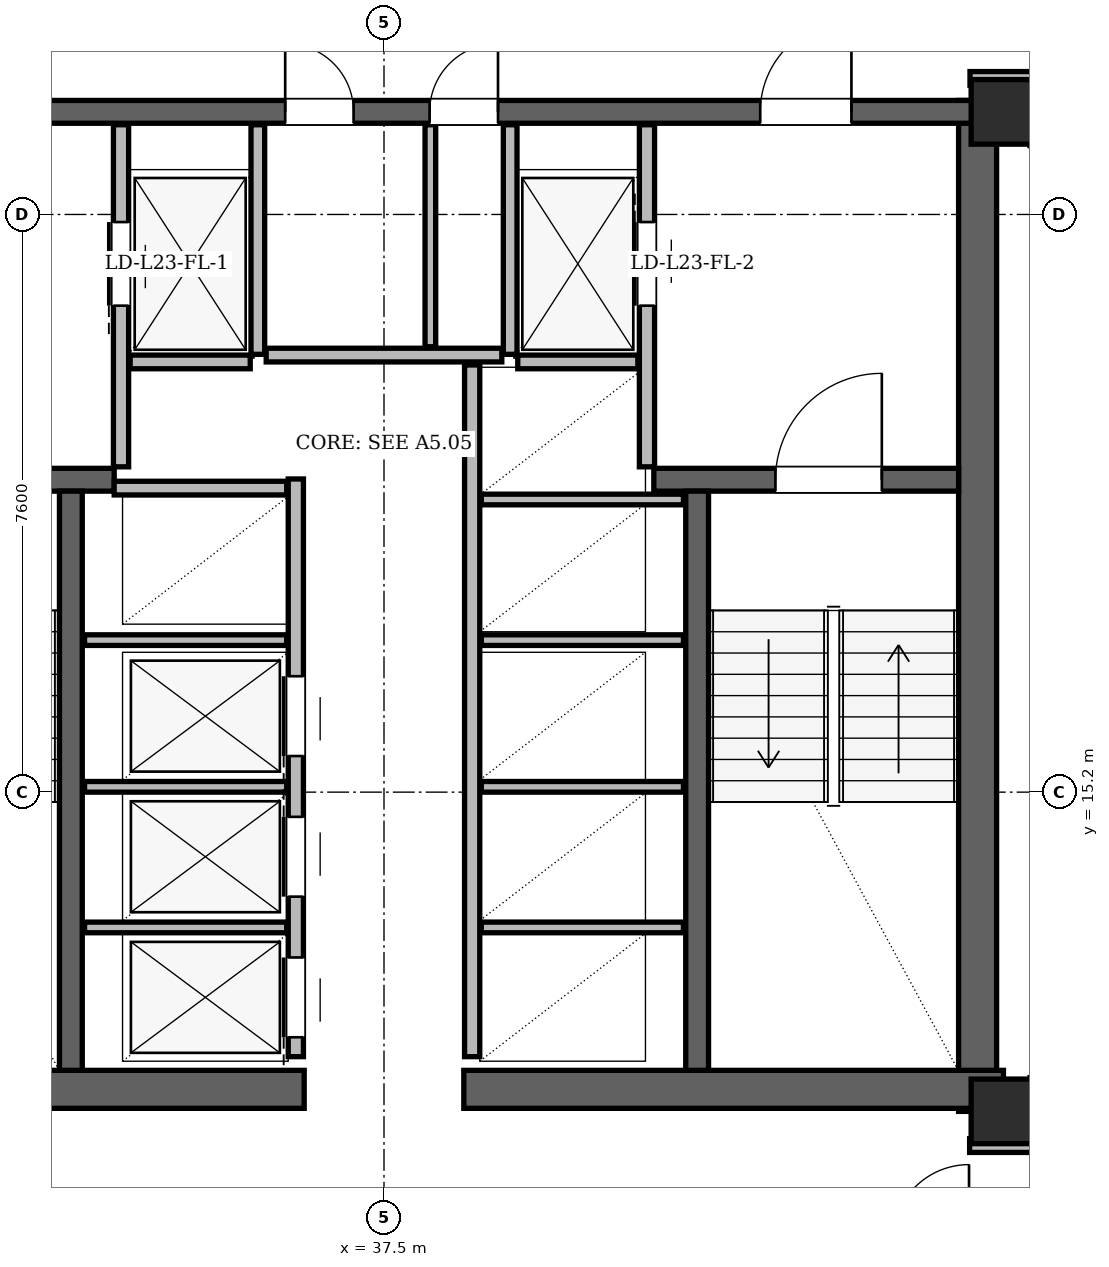
"""IFC4 building model, lengths in metres.
Left out: names, types, materials, properties, quantities, classifications, styles, units other than length and angle.
Written with IfcOpenShell. Run it as: python <this file> out.ifc"""

import sys

from ifc_helpers import new_model, si_unit, direction, frame, frame_2d, origin, origin_2d, place, context, subcontext, project, spatial, rectangle, hollow_rectangle, extrude, element, fill, save


model = new_model("IFC4")
c1 = context("Model", 3, precision=1e-05, world=origin(), true_north=direction((0.0, 1.0)))
c2 = subcontext(c1, "Body", "Model", "MODEL_VIEW")
j1 = project(units=[si_unit("LENGTHUNIT", "METRE"), si_unit("PLANEANGLEUNIT", "RADIAN")], contexts=[c1])
p1 = place(None, origin())
s1 = spatial("IfcSite", under=j1, at=p1, CompositionType="ELEMENT")
p2 = place(p1, origin())
s2 = spatial("IfcBuilding", under=s1, at=p2, CompositionType="ELEMENT")
p3 = place(p2, frame((0.0, 0.0, 89.7)))
s3 = spatial("IfcBuildingStorey", under=s2, at=p3, CompositionType="ELEMENT", Elevation=89.7)
for number, where, z_axis, x_axis in (
    (1, (45.65, 11.0, 0.0), (0.0, 0.0, 1.0), (1.0, 0.0, 0.0)),
    (2, (45.65, 24.15, 0.0), (0.0, 0.0, 1.0), (1.0, 0.0, 0.0)),
):
    element("IfcColumn", number, at=place(p3, frame(where, z_axis=z_axis, x_axis=x_axis)), inside=s3, PredefinedType="COLUMN", context=c2, shape_type="SweptSolid", body=[
        extrude(hollow_rectangle(XDim=0.85, YDim=0.85, WallThickness=0.07, at=origin_2d()), origin(), (0.0, 0.0, 1.0), 3.6),
    ])
p4 = place(p3, frame((45.31, 11.0, 0.0), z_axis=(0.0, 0.0, 1.0), x_axis=(0.0, 1.0, 0.0)))
e3 = element("IfcWall", 3, at=p4, inside=s3, PredefinedType="SHEAR", context=c2, shape_type="SweptSolid", body=[
    extrude(rectangle(XDim=13.3, YDim=0.5, at=frame_2d((6.65, 0.0))), origin(), (0.0, 0.0, 1.0), 3.36),
])
for number, where, z_axis, x_axis in (
    (4, (29.35, 11.29, 0.0), (0.0, 0.0, 1.0), (1.0, 0.0, 0.0)),
    (5, (38.55, 11.29, 0.0), (0.0, 0.0, 1.0), (1.0, 0.0, 0.0)),
):
    element("IfcWall", number, at=place(p3, frame(where, z_axis=z_axis, x_axis=x_axis)), inside=s3, PredefinedType="SHEAR", context=c2, shape_type="SweptSolid", body=[
        extrude(rectangle(XDim=7.1, YDim=0.5, at=frame_2d((3.55, 0.0))), origin(), (0.0, 0.0, 1.0), 3.36),
    ])
p5 = place(p3, frame((29.65, 24.15, 0.0), z_axis=(0.0, 0.0, 1.0), x_axis=(1.0, 0.0, 0.0)))
e6 = element("IfcWall", 6, at=p5, inside=s3, PredefinedType="SHEAR", context=c2, shape_type="SweptSolid", body=[
    extrude(rectangle(XDim=15.7, YDim=0.3, at=frame_2d((7.85, 0.0))), origin(), (0.0, 0.0, 1.0), 3.36),
])
p6 = place(p5, frame((1.7, 0.0, 0.0)))
e7 = element("IfcOpeningElement", 7, at=p6, cuts=e6, PredefinedType="OPENING", context=c2, shape_type="SweptSolid", body=[
    extrude(rectangle(XDim=1.2, YDim=2.2, at=frame_2d((0.6, 1.1))), frame((0.0, 0.15, 0.0), z_axis=(0.0, -1.0, 0.0), x_axis=(1.0, 0.0, 0.0)), (0.0, 0.0, 1.0), 0.3),
])
p7 = place(p5, frame((12.8, 0.0, 0.0)))
e8 = element("IfcOpeningElement", 8, at=p7, cuts=e6, PredefinedType="OPENING", context=c2, shape_type="SweptSolid", body=[
    extrude(rectangle(XDim=1.2, YDim=2.2, at=frame_2d((0.6, 1.1))), frame((0.0, 0.15, 0.0), z_axis=(0.0, -1.0, 0.0), x_axis=(1.0, 0.0, 0.0)), (0.0, 0.0, 1.0), 0.3),
])
p8 = place(p5, frame((6.55, 0.0, 0.0)))
e9 = element("IfcOpeningElement", 9, at=p8, cuts=e6, PredefinedType="OPENING", context=c2, shape_type="SweptSolid", body=[
    extrude(rectangle(XDim=0.9, YDim=2.05, at=frame_2d((0.45, 1.025))), frame((0.0, 0.15, 0.0), z_axis=(0.0, -1.0, 0.0), x_axis=(1.0, 0.0, 0.0)), (0.0, 0.0, 1.0), 0.3),
])
p9 = place(p5, frame((8.45, 0.0, 0.0)))
e10 = element("IfcOpeningElement", 10, at=p9, cuts=e6, PredefinedType="OPENING", context=c2, shape_type="SweptSolid", body=[
    extrude(rectangle(XDim=0.9, YDim=2.05, at=frame_2d((0.45, 1.025))), frame((0.0, 0.15, 0.0), z_axis=(0.0, -1.0, 0.0), x_axis=(1.0, 0.0, 0.0)), (0.0, 0.0, 1.0), 0.3),
])
p10 = place(p3, frame((29.94, 19.31, 0.0), z_axis=(0.0, 0.0, 1.0), x_axis=(1.0, 0.0, 0.0)))
e11 = element("IfcWall", 11, at=p10, inside=s3, PredefinedType="SHEAR", context=c2, shape_type="SweptSolid", body=[
    extrude(rectangle(XDim=4.01, YDim=0.3, at=frame_2d((2.005, 0.0))), origin(), (0.0, 0.0, 1.0), 3.36),
])
p11 = place(p10, frame((1.01, 0.0, 0.0)))
e12 = element("IfcOpeningElement", 12, at=p11, cuts=e11, PredefinedType="OPENING", context=c2, shape_type="SweptSolid", body=[
    extrude(rectangle(XDim=1.4, YDim=2.2, at=frame_2d((0.7, 1.1))), frame((0.0, 0.15, 0.0), z_axis=(0.0, -1.0, 0.0), x_axis=(1.0, 0.0, 0.0)), (0.0, 0.0, 1.0), 0.3),
])
p12 = place(p3, frame((41.05, 19.31, 0.0), z_axis=(0.0, 0.0, 1.0), x_axis=(1.0, 0.0, 0.0)))
e13 = element("IfcWall", 13, at=p12, inside=s3, PredefinedType="SHEAR", context=c2, shape_type="SweptSolid", body=[
    extrude(rectangle(XDim=4.01, YDim=0.3, at=frame_2d((2.005, 0.0))), origin(), (0.0, 0.0, 1.0), 3.36),
])
p13 = place(p12, frame((1.6, 0.0, 0.0)))
e14 = element("IfcOpeningElement", 14, at=p13, cuts=e13, PredefinedType="OPENING", context=c2, shape_type="SweptSolid", body=[
    extrude(rectangle(XDim=1.4, YDim=2.2, at=frame_2d((0.7, 1.1))), frame((0.0, 0.15, 0.0), z_axis=(0.0, -1.0, 0.0), x_axis=(1.0, 0.0, 0.0)), (0.0, 0.0, 1.0), 0.3),
])
for number, where, z_axis, x_axis in (
    (15, (33.38, 11.54, 0.0), (0.0, 0.0, 1.0), (0.0, 1.0, 0.0)),
    (16, (41.62, 11.54, 0.0), (0.0, 0.0, 1.0), (0.0, 1.0, 0.0)),
):
    element("IfcWall", number, at=place(p3, frame(where, z_axis=z_axis, x_axis=x_axis)), inside=s3, PredefinedType="SHEAR", context=c2, shape_type="SweptSolid", body=[
        extrude(rectangle(XDim=7.62, YDim=0.3, at=frame_2d((3.81, 0.0))), origin(), (0.0, 0.0, 1.0), 3.36),
    ])
p14 = place(p3, frame((60.86, 13.798, 0.0), z_axis=(0.0, 0.0, 1.0), x_axis=(-0.500004029544, 0.866023077313, 0.0)))
e17 = element("IfcWall", 17, at=p14, inside=s3, PredefinedType="SOLIDWALL", context=c2, shape_type="SweptSolid", body=[
    extrude(rectangle(XDim=34.275, YDim=0.34, at=frame_2d((17.137, 0.0))), origin(), (0.0, 0.0, 1.0), 2.578),
])
p15 = place(p14, frame((6.579, 0.0, 0.0)))
e18 = element("IfcOpeningElement", 18, at=p15, cuts=e17, PredefinedType="OPENING", context=c2, shape_type="SweptSolid", body=[
    extrude(rectangle(XDim=1.5, YDim=2.2, at=frame_2d((0.75, 1.1))), frame((0.0, 0.17, 0.0), z_axis=(0.0, -1.0, 0.0), x_axis=(1.0, 0.0, 0.0)), (0.0, 0.0, 1.0), 0.34),
])
p16 = place(p14, frame((24.95, 0.0, 0.0)))
e19 = element("IfcOpeningElement", 19, at=p16, cuts=e17, PredefinedType="OPENING", context=c2, shape_type="SweptSolid", body=[
    extrude(rectangle(XDim=1.5, YDim=2.2, at=frame_2d((0.75, 1.1))), frame((0.0, 0.17, 0.0), z_axis=(0.0, -1.0, 0.0), x_axis=(1.0, 0.0, 0.0)), (0.0, 0.0, 1.0), 0.34),
])
p17 = place(p14, frame((1.607, 0.0, 0.85)))
e20 = element("IfcOpeningElement", 20, at=p17, cuts=e17, PredefinedType="OPENING", context=c2, shape_type="SweptSolid", body=[
    extrude(rectangle(XDim=1.2, YDim=1.48, at=frame_2d((0.6, 0.74))), frame((0.0, 0.17, 0.0), z_axis=(0.0, -1.0, 0.0), x_axis=(1.0, 0.0, 0.0)), (0.0, 0.0, 1.0), 0.34),
])
p18 = place(p14, frame((30.62, 0.0, 0.85)))
e21 = element("IfcOpeningElement", 21, at=p18, cuts=e17, PredefinedType="OPENING", context=c2, shape_type="SweptSolid", body=[
    extrude(rectangle(XDim=2.5, YDim=1.618, at=frame_2d((1.25, 0.809))), frame((0.0, 0.17, 0.0), z_axis=(0.0, -1.0, 0.0), x_axis=(1.0, 0.0, 0.0)), (0.0, 0.0, 1.0), 0.34),
])
p19 = place(p14, frame((20.128, 0.0, 0.85)))
e22 = element("IfcOpeningElement", 22, at=p19, cuts=e17, PredefinedType="OPENING", context=c2, shape_type="SweptSolid", body=[
    extrude(rectangle(XDim=2.4, YDim=1.618, at=frame_2d((1.2, 0.809))), frame((0.0, 0.17, 0.0), z_axis=(0.0, -1.0, 0.0), x_axis=(1.0, 0.0, 0.0)), (0.0, 0.0, 1.0), 0.34),
])
p20 = place(p14, frame((26.756, 0.0, 0.85)))
e23 = element("IfcOpeningElement", 23, at=p20, cuts=e17, PredefinedType="OPENING", context=c2, shape_type="SweptSolid", body=[
    extrude(rectangle(XDim=1.2, YDim=1.48, at=frame_2d((0.6, 0.74))), frame((0.0, 0.17, 0.0), z_axis=(0.0, -1.0, 0.0), x_axis=(1.0, 0.0, 0.0)), (0.0, 0.0, 1.0), 0.34),
])
p21 = place(p14, frame((15.335, 0.0, 0.85)))
e24 = element("IfcOpeningElement", 24, at=p21, cuts=e17, PredefinedType="OPENING", context=c2, shape_type="SweptSolid", body=[
    extrude(rectangle(XDim=1.2, YDim=1.48, at=frame_2d((0.6, 0.74))), frame((0.0, 0.17, 0.0), z_axis=(0.0, -1.0, 0.0), x_axis=(1.0, 0.0, 0.0)), (0.0, 0.0, 1.0), 0.34),
])
p22 = place(p14, frame((17.911, 0.0, 0.85)))
e25 = element("IfcOpeningElement", 25, at=p22, cuts=e17, PredefinedType="OPENING", context=c2, shape_type="SweptSolid", body=[
    extrude(rectangle(XDim=1.2, YDim=1.48, at=frame_2d((0.6, 0.74))), frame((0.0, 0.17, 0.0), z_axis=(0.0, -1.0, 0.0), x_axis=(1.0, 0.0, 0.0)), (0.0, 0.0, 1.0), 0.34),
])
p23 = place(p3, frame((34.04, 19.48, 0.0), z_axis=(0.0, 0.0, 1.0), x_axis=(0.0, 1.0, 0.0)))
e26 = element("IfcWall", 26, at=p23, inside=s3, PredefinedType="PARTITIONING", context=c2, shape_type="SweptSolid", body=[
    extrude(rectangle(XDim=4.5, YDim=0.2, at=frame_2d((2.25, 0.0))), origin(), (0.0, 0.0, 1.0), 2.4),
])
p24 = place(p23, frame((2.12, 0.0, 0.0)))
e27 = element("IfcOpeningElement", 27, at=p24, cuts=e26, PredefinedType="OPENING", context=c2, shape_type="SweptSolid", body=[
    extrude(rectangle(XDim=1.1, YDim=2.2, at=frame_2d((0.55, 1.1))), frame((0.0, 0.1, 0.0), z_axis=(0.0, -1.0, 0.0), x_axis=(1.0, 0.0, 0.0)), (0.0, 0.0, 1.0), 0.2),
])
p25 = place(p3, frame((35.84, 20.96, 0.0), z_axis=(0.0, 0.0, 1.0), x_axis=(0.0, 1.0, 0.0)))
e28 = element("IfcWall", 28, at=p25, inside=s3, PredefinedType="PARTITIONING", context=c2, shape_type="SweptSolid", body=[
    extrude(rectangle(XDim=3.02, YDim=0.18, at=frame_2d((1.51, 0.0))), origin(), (0.0, 0.0, 1.0), 2.4),
])
p26 = place(p3, frame((34.16, 20.86, 0.0), z_axis=(0.0, 0.0, 1.0), x_axis=(1.0, 0.0, 0.0)))
e29 = element("IfcWall", 29, at=p26, inside=s3, PredefinedType="PARTITIONING", context=c2, shape_type="SweptSolid", body=[
    extrude(rectangle(XDim=1.58, YDim=0.18, at=frame_2d((0.79, 0.0))), origin(), (0.0, 0.0, 1.0), 3.36),
])
p27 = place(p3, frame((40.96, 19.48, 0.0), z_axis=(0.0, 0.0, 1.0), x_axis=(0.0, 1.0, 0.0)))
e30 = element("IfcWall", 30, at=p27, inside=s3, PredefinedType="PARTITIONING", context=c2, shape_type="SweptSolid", body=[
    extrude(rectangle(XDim=4.5, YDim=0.2, at=frame_2d((2.25, 0.0))), origin(), (0.0, 0.0, 1.0), 2.4),
])
p28 = place(p27, frame((2.12, 0.0, 0.0)))
e31 = element("IfcOpeningElement", 31, at=p28, cuts=e30, PredefinedType="OPENING", context=c2, shape_type="SweptSolid", body=[
    extrude(rectangle(XDim=1.1, YDim=2.2, at=frame_2d((0.55, 1.1))), frame((0.0, 0.1, 0.0), z_axis=(0.0, -1.0, 0.0), x_axis=(1.0, 0.0, 0.0)), (0.0, 0.0, 1.0), 0.2),
])
p29 = place(p3, frame((39.16, 20.96, 0.0), z_axis=(0.0, 0.0, 1.0), x_axis=(0.0, 1.0, 0.0)))
e32 = element("IfcWall", 32, at=p29, inside=s3, PredefinedType="PARTITIONING", context=c2, shape_type="SweptSolid", body=[
    extrude(rectangle(XDim=3.02, YDim=0.18, at=frame_2d((1.51, 0.0))), origin(), (0.0, 0.0, 1.0), 2.4),
])
p30 = place(p3, frame((39.26, 20.86, 0.0), z_axis=(0.0, 0.0, 1.0), x_axis=(1.0, 0.0, 0.0)))
e33 = element("IfcWall", 33, at=p30, inside=s3, PredefinedType="PARTITIONING", context=c2, shape_type="SweptSolid", body=[
    extrude(rectangle(XDim=1.58, YDim=0.18, at=frame_2d((0.79, 0.0))), origin(), (0.0, 0.0, 1.0), 3.36),
])
p31 = place(p3, frame((36.34, 11.72, 0.0), z_axis=(0.0, 0.0, 1.0), x_axis=(0.0, 1.0, 0.0)))
e34 = element("IfcWall", 34, at=p31, inside=s3, PredefinedType="PARTITIONING", context=c2, shape_type="SweptSolid", body=[
    extrude(rectangle(XDim=7.6, YDim=0.2, at=frame_2d((3.8, 0.0))), origin(), (0.0, 0.0, 1.0), 3.36),
])
p32 = place(p31, frame((0.255, 0.0, 0.0)))
e35 = element("IfcOpeningElement", 35, at=p32, cuts=e34, PredefinedType="OPENING", context=c2, shape_type="SweptSolid", body=[
    extrude(rectangle(XDim=1.05, YDim=2.15, at=frame_2d((0.525, 1.075))), frame((0.0, 0.1, 0.0), z_axis=(0.0, -1.0, 0.0), x_axis=(1.0, 0.0, 0.0)), (0.0, 0.0, 1.0), 0.2),
])
p33 = place(p31, frame((2.105, 0.0, 0.0)))
e36 = element("IfcOpeningElement", 36, at=p33, cuts=e34, PredefinedType="OPENING", context=c2, shape_type="SweptSolid", body=[
    extrude(rectangle(XDim=1.05, YDim=2.15, at=frame_2d((0.525, 1.075))), frame((0.0, 0.1, 0.0), z_axis=(0.0, -1.0, 0.0), x_axis=(1.0, 0.0, 0.0)), (0.0, 0.0, 1.0), 0.2),
])
p34 = place(p31, frame((3.955, 0.0, 0.0)))
e37 = element("IfcOpeningElement", 37, at=p34, cuts=e34, PredefinedType="OPENING", context=c2, shape_type="SweptSolid", body=[
    extrude(rectangle(XDim=1.05, YDim=2.15, at=frame_2d((0.525, 1.075))), frame((0.0, 0.1, 0.0), z_axis=(0.0, -1.0, 0.0), x_axis=(1.0, 0.0, 0.0)), (0.0, 0.0, 1.0), 0.2),
])
p35 = place(p3, frame((33.95, 19.2, 0.0), z_axis=(0.0, 0.0, 1.0), x_axis=(1.0, 0.0, 0.0)))
e38 = element("IfcWall", 38, at=p35, inside=s3, PredefinedType="PARTITIONING", context=c2, shape_type="SweptSolid", body=[
    extrude(rectangle(XDim=2.27, YDim=0.18, at=frame_2d((1.135, 0.0))), origin(), (0.0, 0.0, 1.0), 3.36),
])
for number, where, z_axis, x_axis in (
    (39, (33.56, 13.42, 0.0), (0.0, 0.0, 1.0), (1.0, 0.0, 0.0)),
    (40, (33.56, 15.27, 0.0), (0.0, 0.0, 1.0), (1.0, 0.0, 0.0)),
    (41, (33.56, 17.2, 0.0), (0.0, 0.0, 1.0), (1.0, 0.0, 0.0)),
):
    element("IfcWall", number, at=place(p3, frame(where, z_axis=z_axis, x_axis=x_axis)), inside=s3, PredefinedType="PARTITIONING", context=c2, shape_type="SweptSolid", body=[
        extrude(rectangle(XDim=2.66, YDim=0.14, at=frame_2d((1.33, 0.0))), origin(), (0.0, 0.0, 1.0), 3.36),
    ])
p36 = place(p3, frame((38.66, 11.72, 0.0), z_axis=(0.0, 0.0, 1.0), x_axis=(0.0, 1.0, 0.0)))
e42 = element("IfcWall", 42, at=p36, inside=s3, PredefinedType="PARTITIONING", context=c2, shape_type="SweptSolid", body=[
    extrude(rectangle(XDim=9.1, YDim=0.2, at=frame_2d((4.55, 0.0))), origin(), (0.0, 0.0, 1.0), 3.36),
])
for number, where, z_axis, x_axis in (
    (43, (38.78, 13.42, 0.0), (0.0, 0.0, 1.0), (1.0, 0.0, 0.0)),
    (44, (38.78, 15.27, 0.0), (0.0, 0.0, 1.0), (1.0, 0.0, 0.0)),
    (45, (38.78, 17.2, 0.0), (0.0, 0.0, 1.0), (1.0, 0.0, 0.0)),
    (46, (38.78, 19.05, 0.0), (0.0, 0.0, 1.0), (1.0, 0.0, 0.0)),
):
    element("IfcWall", number, at=place(p3, frame(where, z_axis=z_axis, x_axis=x_axis)), inside=s3, PredefinedType="PARTITIONING", context=c2, shape_type="SweptSolid", body=[
        extrude(rectangle(XDim=2.66, YDim=0.14, at=frame_2d((1.33, 0.0))), origin(), (0.0, 0.0, 1.0), 3.36),
    ])
p37 = place(p3, frame((35.95, 20.95, 0.0), z_axis=(0.0, 0.0, 1.0), x_axis=(1.0, 0.0, 0.0)))
e47 = element("IfcWall", 47, at=p37, inside=s3, PredefinedType="PARTITIONING", context=c2, shape_type="SweptSolid", body=[
    extrude(rectangle(XDim=3.1, YDim=0.18, at=frame_2d((1.55, 0.0))), origin(), (0.0, 0.0, 1.0), 3.36),
])
p38 = place(p3, frame((38.11, 21.06, 0.0), z_axis=(0.0, 0.0, 1.0), x_axis=(0.0, 1.0, 0.0)))
e48 = element("IfcWall", 48, at=p38, inside=s3, PredefinedType="PARTITIONING", context=c2, shape_type="SweptSolid", body=[
    extrude(rectangle(XDim=2.92, YDim=0.14, at=frame_2d((1.46, 0.0))), origin(), (0.0, 0.0, 1.0), 2.4),
])
p39 = place(p3, frame((45.205, 10.55, 0.0), z_axis=(0.0, 0.0, 1.0), x_axis=(1.0, 0.0, 0.0)))
e49 = element("IfcWall", 49, at=p39, inside=s3, PredefinedType="PARTITIONING", context=c2, shape_type="SweptSolid", body=[
    extrude(rectangle(XDim=0.89, YDim=0.18, at=frame_2d((0.445, 0.0))), origin(), (0.0, 0.0, 1.0), 3.36),
])
p40 = place(p3, frame((45.21, 24.59, 0.0), z_axis=(0.0, 0.0, 1.0), x_axis=(1.0, 0.0, 0.0)))
e50 = element("IfcWall", 50, at=p40, inside=s3, PredefinedType="PARTITIONING", context=c2, shape_type="SweptSolid", body=[
    extrude(rectangle(XDim=0.88, YDim=0.18, at=frame_2d((0.44, 0.0))), origin(), (0.0, 0.0, 1.0), 2.814),
])
p41 = place(p24, origin())
e51 = element("IfcDoor", 51, at=p41, inside=s3, OperationType="SLIDING_TO_LEFT", PredefinedType="DOOR", context=c2, shape_type="SweptSolid", body=[
    extrude(rectangle(XDim=1.1, YDim=2.2, at=frame_2d((0.55, 1.1))), frame((0.0, 0.025, 0.0), z_axis=(0.0, -1.0, 0.0), x_axis=(1.0, 0.0, 0.0)), (0.0, 0.0, 1.0), 0.05),
])
fill(e27, e51)
p42 = place(p28, origin())
e52 = element("IfcDoor", 52, at=p42, inside=s3, OperationType="SLIDING_TO_RIGHT", PredefinedType="DOOR", context=c2, shape_type="SweptSolid", body=[
    extrude(rectangle(XDim=1.1, YDim=2.2, at=frame_2d((0.55, 1.1))), frame((0.0, 0.025, 0.0), z_axis=(0.0, -1.0, 0.0), x_axis=(1.0, 0.0, 0.0)), (0.0, 0.0, 1.0), 0.05),
])
fill(e31, e52)
p43 = place(p32, origin())
e53 = element("IfcDoor", 53, at=p43, inside=s3, OperationType="SLIDING_TO_LEFT", PredefinedType="DOOR", context=c2, shape_type="SweptSolid", body=[
    extrude(rectangle(XDim=1.05, YDim=2.15, at=frame_2d((0.525, 1.075))), frame((0.0, 0.025, 0.0), z_axis=(0.0, -1.0, 0.0), x_axis=(1.0, 0.0, 0.0)), (0.0, 0.0, 1.0), 0.05),
])
fill(e35, e53)
p44 = place(p33, origin())
e54 = element("IfcDoor", 54, at=p44, inside=s3, OperationType="SLIDING_TO_RIGHT", PredefinedType="DOOR", context=c2, shape_type="SweptSolid", body=[
    extrude(rectangle(XDim=1.05, YDim=2.15, at=frame_2d((0.525, 1.075))), frame((0.0, 0.025, 0.0), z_axis=(0.0, -1.0, 0.0), x_axis=(1.0, 0.0, 0.0)), (0.0, 0.0, 1.0), 0.05),
])
fill(e36, e54)
p45 = place(p34, origin())
e55 = element("IfcDoor", 55, at=p45, inside=s3, OperationType="SLIDING_TO_LEFT", PredefinedType="DOOR", context=c2, shape_type="SweptSolid", body=[
    extrude(rectangle(XDim=1.05, YDim=2.15, at=frame_2d((0.525, 1.075))), frame((0.0, 0.025, 0.0), z_axis=(0.0, -1.0, 0.0), x_axis=(1.0, 0.0, 0.0)), (0.0, 0.0, 1.0), 0.05),
])
fill(e37, e55)
p46 = place(p13, origin())
e56 = element("IfcDoor", 56, at=p46, inside=s3, OperationType="SINGLE_SWING_RIGHT", PredefinedType="DOOR", context=c2, shape_type="SweptSolid", body=[
    extrude(rectangle(XDim=1.4, YDim=2.2, at=frame_2d((0.7, 1.1))), frame((0.0, 0.025, 0.0), z_axis=(0.0, -1.0, 0.0), x_axis=(1.0, 0.0, 0.0)), (0.0, 0.0, 1.0), 0.05),
])
fill(e14, e56)
p47 = place(p7, origin())
e57 = element("IfcDoor", 57, at=p47, inside=s3, OperationType="SINGLE_SWING_RIGHT", PredefinedType="DOOR", context=c2, shape_type="SweptSolid", body=[
    extrude(rectangle(XDim=1.2, YDim=2.2, at=frame_2d((0.6, 1.1))), frame((0.0, 0.025, 0.0), z_axis=(0.0, -1.0, 0.0), x_axis=(1.0, 0.0, 0.0)), (0.0, 0.0, 1.0), 0.05),
])
fill(e8, e57)
p48 = place(p8, origin())
e58 = element("IfcDoor", 58, at=p48, inside=s3, OperationType="SINGLE_SWING_LEFT", PredefinedType="DOOR", context=c2, shape_type="SweptSolid", body=[
    extrude(rectangle(XDim=0.9, YDim=2.05, at=frame_2d((0.45, 1.025))), frame((0.0, 0.025, 0.0), z_axis=(0.0, -1.0, 0.0), x_axis=(1.0, 0.0, 0.0)), (0.0, 0.0, 1.0), 0.05),
])
fill(e9, e58)
p49 = place(p9, origin())
e59 = element("IfcDoor", 59, at=p49, inside=s3, OperationType="SINGLE_SWING_RIGHT", PredefinedType="DOOR", context=c2, shape_type="SweptSolid", body=[
    extrude(rectangle(XDim=0.9, YDim=2.05, at=frame_2d((0.45, 1.025))), frame((0.0, 0.025, 0.0), z_axis=(0.0, -1.0, 0.0), x_axis=(1.0, 0.0, 0.0)), (0.0, 0.0, 1.0), 0.05),
])
fill(e10, e59)
save(model, sys.argv[1])
